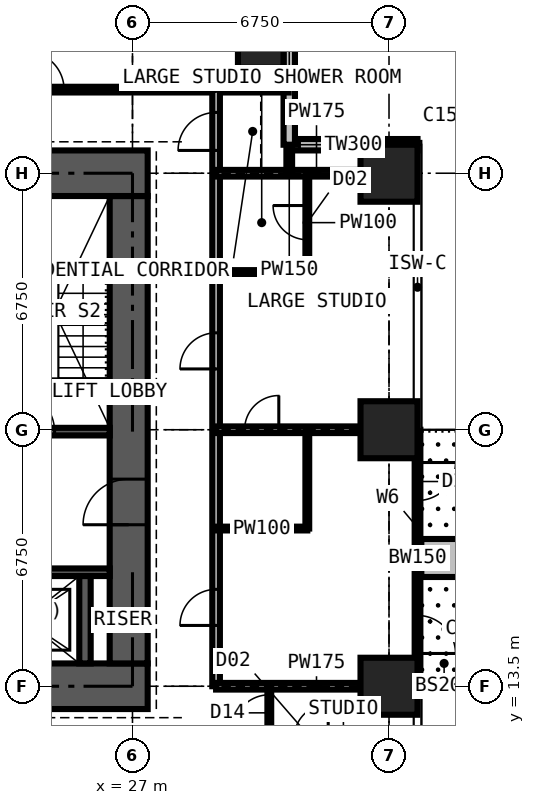
"""IFC4 building model, lengths in metres.
Left out: names, types, materials, properties, quantities, classifications, styles, units other than length and angle.
Written with IfcOpenShell. Run it as: python <this file> out.ifc"""

import sys

from ifc_helpers import new_model, si_unit, direction, frame, frame_2d, origin, origin_2d, place, context, subcontext, project, spatial, rectangle, extrude, element, fill, save


model = new_model("IFC4")
c1 = context("Model", 3, precision=1e-05, world=origin(), true_north=direction((0.0, 1.0)))
c2 = subcontext(c1, "Body", "Model", "MODEL_VIEW")
j1 = project(units=[si_unit("LENGTHUNIT", "METRE"), si_unit("PLANEANGLEUNIT", "RADIAN")], contexts=[c1])
p1 = place(None, origin())
s1 = spatial("IfcSite", under=j1, at=p1, CompositionType="ELEMENT")
p2 = place(p1, origin())
s2 = spatial("IfcBuilding", under=s1, at=p2, CompositionType="ELEMENT")
p3 = place(p2, frame((0.0, 0.0, 149.4)))
s3 = spatial("IfcBuildingStorey", under=s2, at=p3, CompositionType="ELEMENT", Elevation=149.4)
p4 = place(p3, frame((30.375, 30.375, 0.0), z_axis=(0.0, 0.0, 1.0), x_axis=(1.0, 0.0, 0.0)))
e1 = element("IfcColumn", 1, at=p4, inside=s3, PredefinedType="COLUMN", context=c2, shape_type="SweptSolid", body=[
    extrude(rectangle(XDim=1.2, YDim=1.2, at=origin_2d()), origin(), (0.0, 0.0, 1.0), 3.6),
])
for number, where, z_axis, x_axis in (
    (2, (33.75, 13.5, 0.0), (0.0, 0.0, 1.0), (1.0, 0.0, 0.0)),
    (3, (33.75, 20.25, 0.0), (0.0, 0.0, 1.0), (1.0, 0.0, 0.0)),
    (4, (33.75, 27.0, 0.0), (0.0, 0.0, 1.0), (1.0, 0.0, 0.0)),
):
    element("IfcColumn", number, at=place(p3, frame(where, z_axis=z_axis, x_axis=x_axis)), inside=s3, PredefinedType="COLUMN", context=c2, shape_type="SweptSolid", body=[
        extrude(rectangle(XDim=1.5, YDim=1.5, at=origin_2d()), origin(), (0.0, 0.0, 1.0), 3.6),
    ])
p5 = place(p3, frame((13.1, 13.5, 0.0), z_axis=(0.0, 0.0, 1.0), x_axis=(1.0, 0.0, 0.0)))
e5 = element("IfcWall", 5, at=p5, inside=s3, PredefinedType="SHEAR", context=c2, shape_type="SweptSolid", body=[
    extrude(rectangle(XDim=14.3, YDim=1.2, at=frame_2d((7.15, 0.0))), origin(), (0.0, 0.0, 1.0), 3.6),
])
p6 = place(p3, frame((26.9, 14.1, 0.0), z_axis=(0.0, 0.0, 1.0), x_axis=(0.0, 1.0, 0.0)))
e6 = element("IfcWall", 6, at=p6, inside=s3, PredefinedType="SHEAR", context=c2, shape_type="SweptSolid", body=[
    extrude(rectangle(XDim=12.3, YDim=1.0, at=frame_2d((6.15, 0.0))), origin(), (0.0, 0.0, 1.0), 3.6),
])
p7 = place(p6, frame((3.65, 0.0, 0.0)))
e7 = element("IfcOpeningElement", 7, at=p7, cuts=e6, PredefinedType="OPENING", context=c2, shape_type="SweptSolid", body=[
    extrude(rectangle(XDim=1.2, YDim=2.2, at=frame_2d((0.6, 1.1))), frame((0.0, 0.51, 0.0), z_axis=(0.0, -1.0, 0.0), x_axis=(1.0, 0.0, 0.0)), (0.0, 0.0, 1.0), 1.02),
])
p8 = place(p3, frame((27.4, 27.0, 0.0), z_axis=(0.0, 0.0, 1.0), x_axis=(-1.0, 0.0, 0.0)))
e8 = element("IfcWall", 8, at=p8, inside=s3, PredefinedType="SHEAR", context=c2, shape_type="SweptSolid", body=[
    extrude(rectangle(XDim=14.3, YDim=1.2, at=frame_2d((7.15, 0.0))), origin(), (0.0, 0.0, 1.0), 3.6),
])
p9 = place(p8, frame((5.225, 0.0, 0.0)))
e9 = element("IfcOpeningElement", 9, at=p9, cuts=e8, PredefinedType="OPENING", context=c2, shape_type="SweptSolid", body=[
    extrude(rectangle(XDim=0.9, YDim=2.2, at=frame_2d((0.45, 1.1))), frame((0.0, 0.61, 0.0), z_axis=(0.0, -1.0, 0.0), x_axis=(1.0, 0.0, 0.0)), (0.0, 0.0, 1.0), 1.22),
])
p10 = place(p8, frame((8.2, 0.0, 0.0)))
e10 = element("IfcOpeningElement", 10, at=p10, cuts=e8, PredefinedType="OPENING", context=c2, shape_type="SweptSolid", body=[
    extrude(rectangle(XDim=1.0, YDim=2.2, at=frame_2d((0.5, 1.1))), frame((0.0, 0.61, 0.0), z_axis=(0.0, -1.0, 0.0), x_axis=(1.0, 0.0, 0.0)), (0.0, 0.0, 1.0), 1.22),
])
p11 = place(p3, frame((34.5, 20.25, 0.0), z_axis=(0.0, 0.0, 1.0), x_axis=(0.0, -1.0, 0.0)))
e11 = element("IfcWall", 11, at=p11, inside=s3, PredefinedType="SOLIDWALL", context=c2, shape_type="SweptSolid", body=[
    extrude(rectangle(XDim=6.75, YDim=0.15, at=frame_2d((3.375, 0.0))), origin(), (0.0, 0.0, 1.0), 3.375),
])
p12 = place(p11, frame((0.863, 0.0, 0.0)))
e12 = element("IfcOpeningElement", 12, at=p12, cuts=e11, PredefinedType="OPENING", context=c2, shape_type="SweptSolid", body=[
    extrude(rectangle(XDim=1.0, YDim=2.2, at=frame_2d((0.5, 1.1))), frame((0.0, 0.085, 0.0), z_axis=(0.0, -1.0, 0.0), x_axis=(1.0, 0.0, 0.0)), (0.0, 0.0, 1.0), 0.17),
])
p13 = place(p11, frame((1.975, 0.0, 0.9)))
e13 = element("IfcOpeningElement", 13, at=p13, cuts=e11, PredefinedType="OPENING", context=c2, shape_type="SweptSolid", body=[
    extrude(rectangle(XDim=1.2, YDim=1.8, at=frame_2d((0.6, 0.9))), frame((0.0, 0.085, 0.0), z_axis=(0.0, -1.0, 0.0), x_axis=(1.0, 0.0, 0.0)), (0.0, 0.0, 1.0), 0.17),
])
p14 = place(p11, frame((4.887, 0.0, 0.0)))
e14 = element("IfcOpeningElement", 14, at=p14, cuts=e11, PredefinedType="OPENING", context=c2, shape_type="SweptSolid", body=[
    extrude(rectangle(XDim=1.0, YDim=2.2, at=frame_2d((0.5, 1.1))), frame((0.0, 0.085, 0.0), z_axis=(0.0, -1.0, 0.0), x_axis=(1.0, 0.0, 0.0)), (0.0, 0.0, 1.0), 0.17),
])
p15 = place(p11, frame((3.575, 0.0, 0.9)))
e15 = element("IfcOpeningElement", 15, at=p15, cuts=e11, PredefinedType="OPENING", context=c2, shape_type="SweptSolid", body=[
    extrude(rectangle(XDim=1.2, YDim=1.8, at=frame_2d((0.6, 0.9))), frame((0.0, 0.085, 0.0), z_axis=(0.0, -1.0, 0.0), x_axis=(1.0, 0.0, 0.0)), (0.0, 0.0, 1.0), 0.17),
])
p16 = place(p3, frame((34.5, 27.75, 0.0), z_axis=(0.0, 0.0, 1.0), x_axis=(-1.0, 0.0, 0.0)))
e16 = element("IfcWall", 16, at=p16, inside=s3, PredefinedType="SOLIDWALL", context=c2, shape_type="SweptSolid", body=[
    extrude(rectangle(XDim=3.375, YDim=0.3, at=frame_2d((1.688, 0.0))), origin(), (0.0, 0.0, 1.0), 3.375),
])
p17 = place(p16, frame((1.607, 0.0, 0.9)))
e17 = element("IfcOpeningElement", 17, at=p17, cuts=e16, PredefinedType="OPENING", context=c2, shape_type="SweptSolid", body=[
    extrude(rectangle(XDim=1.5, YDim=1.8, at=frame_2d((0.75, 0.9))), frame((0.0, 0.16, 0.0), z_axis=(0.0, -1.0, 0.0), x_axis=(1.0, 0.0, 0.0)), (0.0, 0.0, 1.0), 0.32),
])
p18 = place(p3, frame((31.125, 27.75, 0.0), z_axis=(0.0, 0.0, 1.0), x_axis=(0.0, 1.0, 0.0)))
e18 = element("IfcWall", 18, at=p18, inside=s3, PredefinedType="SOLIDWALL", context=c2, shape_type="SweptSolid", body=[
    extrude(rectangle(XDim=3.375, YDim=0.3, at=frame_2d((1.688, 0.0))), origin(), (0.0, 0.0, 1.0), 3.375),
])
p19 = place(p18, frame((1.663, 0.0, 0.9)))
e19 = element("IfcOpeningElement", 19, at=p19, cuts=e18, PredefinedType="OPENING", context=c2, shape_type="SweptSolid", body=[
    extrude(rectangle(XDim=1.5, YDim=1.8, at=frame_2d((0.75, 0.9))), frame((0.0, 0.16, 0.0), z_axis=(0.0, -1.0, 0.0), x_axis=(1.0, 0.0, 0.0)), (0.0, 0.0, 1.0), 0.32),
])
p20 = place(p3, frame((34.6, 16.875, 0.0), z_axis=(0.0, 0.0, 1.0), x_axis=(1.0, 0.0, 0.0)))
e20 = element("IfcWall", 20, at=p20, inside=s3, PredefinedType="USERDEFINED", context=c2, shape_type="SweptSolid", body=[
    extrude(rectangle(XDim=2.2, YDim=1.0, at=frame_2d((1.1, 0.0))), origin(), (0.0, 0.0, 1.0), 0.9),
])
p21 = place(p3, frame((14.1, 16.5, 0.0), z_axis=(0.0, 0.0, 1.0), x_axis=(1.0, 0.0, 0.0)))
e21 = element("IfcWall", 21, at=p21, inside=s3, PredefinedType="SHEAR", context=c2, shape_type="SweptSolid", body=[
    extrude(rectangle(XDim=12.3, YDim=0.2, at=frame_2d((6.15, 0.0))), origin(), (0.0, 0.0, 1.0), 3.6),
])
p22 = place(p21, frame((0.9, 0.0, 0.0)))
e22 = element("IfcOpeningElement", 22, at=p22, cuts=e21, PredefinedType="OPENING", context=c2, shape_type="SweptSolid", body=[
    extrude(rectangle(XDim=1.1, YDim=2.2, at=frame_2d((0.55, 1.1))), frame((0.0, 0.11, 0.0), z_axis=(0.0, -1.0, 0.0), x_axis=(1.0, 0.0, 0.0)), (0.0, 0.0, 1.0), 0.22),
])
p23 = place(p21, frame((4.31, 0.0, 0.0)))
e23 = element("IfcOpeningElement", 23, at=p23, cuts=e21, PredefinedType="OPENING", context=c2, shape_type="SweptSolid", body=[
    extrude(rectangle(XDim=1.1, YDim=2.2, at=frame_2d((0.55, 1.1))), frame((0.0, 0.11, 0.0), z_axis=(0.0, -1.0, 0.0), x_axis=(1.0, 0.0, 0.0)), (0.0, 0.0, 1.0), 0.22),
])
p24 = place(p21, frame((6.45, 0.0, 0.0)))
e24 = element("IfcOpeningElement", 24, at=p24, cuts=e21, PredefinedType="OPENING", context=c2, shape_type="SweptSolid", body=[
    extrude(rectangle(XDim=1.1, YDim=2.2, at=frame_2d((0.55, 1.1))), frame((0.0, 0.11, 0.0), z_axis=(0.0, -1.0, 0.0), x_axis=(1.0, 0.0, 0.0)), (0.0, 0.0, 1.0), 0.22),
])
p25 = place(p21, frame((9.5, 0.0, 0.0)))
e25 = element("IfcOpeningElement", 25, at=p25, cuts=e21, PredefinedType="OPENING", context=c2, shape_type="SweptSolid", body=[
    extrude(rectangle(XDim=1.1, YDim=2.2, at=frame_2d((0.55, 1.1))), frame((0.0, 0.11, 0.0), z_axis=(0.0, -1.0, 0.0), x_axis=(1.0, 0.0, 0.0)), (0.0, 0.0, 1.0), 0.22),
])
p26 = place(p3, frame((14.1, 20.2, 0.0), z_axis=(0.0, 0.0, 1.0), x_axis=(1.0, 0.0, 0.0)))
e26 = element("IfcWall", 26, at=p26, inside=s3, PredefinedType="SHEAR", context=c2, shape_type="SweptSolid", body=[
    extrude(rectangle(XDim=12.3, YDim=0.2, at=frame_2d((6.15, 0.0))), origin(), (0.0, 0.0, 1.0), 3.6),
])
p27 = place(p26, frame((4.56, 0.0, 0.0)))
e27 = element("IfcOpeningElement", 27, at=p27, cuts=e26, PredefinedType="OPENING", context=c2, shape_type="SweptSolid", body=[
    extrude(rectangle(XDim=1.1, YDim=2.2, at=frame_2d((0.55, 1.1))), frame((0.0, 0.11, 0.0), z_axis=(0.0, -1.0, 0.0), x_axis=(1.0, 0.0, 0.0)), (0.0, 0.0, 1.0), 0.22),
])
p28 = place(p26, frame((6.7, 0.0, 0.0)))
e28 = element("IfcOpeningElement", 28, at=p28, cuts=e26, PredefinedType="OPENING", context=c2, shape_type="SweptSolid", body=[
    extrude(rectangle(XDim=1.1, YDim=2.2, at=frame_2d((0.55, 1.1))), frame((0.0, 0.11, 0.0), z_axis=(0.0, -1.0, 0.0), x_axis=(1.0, 0.0, 0.0)), (0.0, 0.0, 1.0), 0.22),
])
p29 = place(p26, frame((0.35, 0.0, 0.0)))
e29 = element("IfcOpeningElement", 29, at=p29, cuts=e26, PredefinedType="OPENING", context=c2, shape_type="SweptSolid", body=[
    extrude(rectangle(XDim=1.1, YDim=2.2, at=frame_2d((0.55, 1.1))), frame((0.0, 0.11, 0.0), z_axis=(0.0, -1.0, 0.0), x_axis=(1.0, 0.0, 0.0)), (0.0, 0.0, 1.0), 0.22),
])
p30 = place(p26, frame((9.75, 0.0, 0.0)))
e30 = element("IfcOpeningElement", 30, at=p30, cuts=e26, PredefinedType="OPENING", context=c2, shape_type="SweptSolid", body=[
    extrude(rectangle(XDim=1.1, YDim=2.2, at=frame_2d((0.55, 1.1))), frame((0.0, 0.11, 0.0), z_axis=(0.0, -1.0, 0.0), x_axis=(1.0, 0.0, 0.0)), (0.0, 0.0, 1.0), 0.22),
])
p31 = place(p3, frame((25.75, 14.1, 0.0), z_axis=(0.0, 0.0, 1.0), x_axis=(0.0, 1.0, 0.0)))
e31 = element("IfcWall", 31, at=p31, inside=s3, PredefinedType="SHEAR", context=c2, shape_type="SweptSolid", body=[
    extrude(rectangle(XDim=2.3, YDim=0.3, at=frame_2d((1.15, 0.0))), origin(), (0.0, 0.0, 1.0), 3.6),
])
p32 = place(p3, frame((11.3, 29.2, 0.0), z_axis=(0.0, 0.0, 1.0), x_axis=(1.0, 0.0, 0.0)))
e32 = element("IfcWall", 32, at=p32, inside=s3, PredefinedType="PARTITIONING", context=c2, shape_type="SweptSolid", body=[
    extrude(rectangle(XDim=19.809, YDim=0.15, at=frame_2d((9.904, 0.0))), origin(), (0.0, 0.0, 1.0), 3.375),
])
p33 = place(p32, frame((12.9, 0.0, 0.0)))
e33 = element("IfcOpeningElement", 33, at=p33, cuts=e32, PredefinedType="OPENING", context=c2, shape_type="SweptSolid", body=[
    extrude(rectangle(XDim=1.0, YDim=2.2, at=frame_2d((0.5, 1.1))), frame((0.0, 0.085, 0.0), z_axis=(0.0, -1.0, 0.0), x_axis=(1.0, 0.0, 0.0)), (0.0, 0.0, 1.0), 0.17),
])
p34 = place(p32, frame((6.4, 0.0, 0.0)))
e34 = element("IfcOpeningElement", 34, at=p34, cuts=e32, PredefinedType="OPENING", context=c2, shape_type="SweptSolid", body=[
    extrude(rectangle(XDim=0.95, YDim=2.2, at=frame_2d((0.475, 1.1))), frame((0.0, 0.085, 0.0), z_axis=(0.0, -1.0, 0.0), x_axis=(1.0, 0.0, 0.0)), (0.0, 0.0, 1.0), 0.17),
])
p35 = place(p32, frame((0.6, 0.0, 0.0)))
e35 = element("IfcOpeningElement", 35, at=p35, cuts=e32, PredefinedType="OPENING", context=c2, shape_type="SweptSolid", body=[
    extrude(rectangle(XDim=1.0, YDim=2.2, at=frame_2d((0.5, 1.1))), frame((0.0, 0.085, 0.0), z_axis=(0.0, -1.0, 0.0), x_axis=(1.0, 0.0, 0.0)), (0.0, 0.0, 1.0), 0.17),
])
p36 = place(p3, frame((29.2, 13.5, 0.0), z_axis=(0.0, 0.0, 1.0), x_axis=(0.0, 1.0, 0.0)))
e36 = element("IfcWall", 36, at=p36, inside=s3, PredefinedType="PARTITIONING", context=c2, shape_type="SweptSolid", body=[
    extrude(rectangle(XDim=15.7, YDim=0.2, at=frame_2d((7.85, 0.0))), origin(), (0.0, 0.0, 1.0), 3.375),
])
p37 = place(p36, frame((8.35, 0.0, 0.0)))
e37 = element("IfcOpeningElement", 37, at=p37, cuts=e36, PredefinedType="OPENING", context=c2, shape_type="SweptSolid", body=[
    extrude(rectangle(XDim=0.95, YDim=2.2, at=frame_2d((0.475, 1.1))), frame((0.0, 0.11, 0.0), z_axis=(0.0, -1.0, 0.0), x_axis=(1.0, 0.0, 0.0)), (0.0, 0.0, 1.0), 0.22),
])
p38 = place(p36, frame((1.6, 0.0, 0.0)))
e38 = element("IfcOpeningElement", 38, at=p38, cuts=e36, PredefinedType="OPENING", context=c2, shape_type="SweptSolid", body=[
    extrude(rectangle(XDim=0.95, YDim=2.2, at=frame_2d((0.475, 1.1))), frame((0.0, 0.11, 0.0), z_axis=(0.0, -1.0, 0.0), x_axis=(1.0, 0.0, 0.0)), (0.0, 0.0, 1.0), 0.22),
])
p39 = place(p36, frame((14.1, 0.0, 0.0)))
e39 = element("IfcOpeningElement", 39, at=p39, cuts=e36, PredefinedType="OPENING", context=c2, shape_type="SweptSolid", body=[
    extrude(rectangle(XDim=1.0, YDim=2.2, at=frame_2d((0.5, 1.1))), frame((0.0, 0.11, 0.0), z_axis=(0.0, -1.0, 0.0), x_axis=(1.0, 0.0, 0.0)), (0.0, 0.0, 1.0), 0.22),
])
p40 = place(p3, frame((29.2, 13.5, 0.0), z_axis=(0.0, 0.0, 1.0), x_axis=(1.0, 0.0, 0.0)))
e40 = element("IfcWall", 40, at=p40, inside=s3, PredefinedType="PARTITIONING", context=c2, shape_type="SweptSolid", body=[
    extrude(rectangle(XDim=5.284, YDim=0.175, at=frame_2d((2.642, 0.0))), origin(), (0.0, 0.0, 1.0), 2.806),
])
p41 = place(p3, frame((29.2, 17.65, 0.0), z_axis=(0.0, 0.0, 1.0), x_axis=(1.0, 0.0, 0.0)))
e41 = element("IfcWall", 41, at=p41, inside=s3, PredefinedType="PARTITIONING", context=c2, shape_type="SweptSolid", body=[
    extrude(rectangle(XDim=2.4, YDim=0.1, at=frame_2d((1.2, 0.0))), origin(), (0.0, 0.0, 1.0), 3.375),
])
p42 = place(p3, frame((29.2, 20.25, 0.0), z_axis=(0.0, 0.0, 1.0), x_axis=(1.0, 0.0, 0.0)))
e42 = element("IfcWall", 42, at=p42, inside=s3, PredefinedType="PARTITIONING", context=c2, shape_type="SweptSolid", body=[
    extrude(rectangle(XDim=5.284, YDim=0.175, at=frame_2d((2.642, 0.0))), origin(), (0.0, 0.0, 1.0), 2.806),
])
p43 = place(p42, frame((0.75, 0.0, 0.0)))
e43 = element("IfcOpeningElement", 43, at=p43, cuts=e42, PredefinedType="OPENING", context=c2, shape_type="SweptSolid", body=[
    extrude(rectangle(XDim=0.9, YDim=2.2, at=frame_2d((0.45, 1.1))), frame((0.0, 0.097, 0.0), z_axis=(0.0, -1.0, 0.0), x_axis=(1.0, 0.0, 0.0)), (0.0, 0.0, 1.0), 0.195),
])
p44 = place(p3, frame((29.2, 24.4, 0.0), z_axis=(0.0, 0.0, 1.0), x_axis=(1.0, 0.0, 0.0)))
e44 = element("IfcWall", 44, at=p44, inside=s3, PredefinedType="PARTITIONING", context=c2, shape_type="SweptSolid", body=[
    extrude(rectangle(XDim=2.4, YDim=0.1, at=frame_2d((1.2, 0.0))), origin(), (0.0, 0.0, 1.0), 3.375),
])
p45 = place(p3, frame((29.2, 27.0, 0.0), z_axis=(0.0, 0.0, 1.0), x_axis=(1.0, 0.0, 0.0)))
e45 = element("IfcWall", 45, at=p45, inside=s3, PredefinedType="PARTITIONING", context=c2, shape_type="SweptSolid", body=[
    extrude(rectangle(XDim=5.284, YDim=0.175, at=frame_2d((2.642, 0.0))), origin(), (0.0, 0.0, 1.0), 2.806),
])
p46 = place(p3, frame((30.6, 10.125, 0.0), z_axis=(0.0, 0.0, 1.0), x_axis=(0.0, 1.0, 0.0)))
e46 = element("IfcWall", 46, at=p46, inside=s3, PredefinedType="PARTITIONING", context=c2, shape_type="SweptSolid", body=[
    extrude(rectangle(XDim=3.375, YDim=0.1, at=frame_2d((1.688, 0.0))), origin(), (0.0, 0.0, 1.0), 3.375),
])
p47 = place(p46, frame((2.2, 0.0, 0.0)))
e47 = element("IfcOpeningElement", 47, at=p47, cuts=e46, PredefinedType="OPENING", context=c2, shape_type="SweptSolid", body=[
    extrude(rectangle(XDim=0.95, YDim=2.2, at=frame_2d((0.475, 1.1))), frame((0.0, 0.06, 0.0), z_axis=(0.0, -1.0, 0.0), x_axis=(1.0, 0.0, 0.0)), (0.0, 0.0, 1.0), 0.12),
])
p48 = place(p3, frame((31.125, 27.0, 0.0), z_axis=(0.0, 0.0, 1.0), x_axis=(0.0, 1.0, 0.0)))
e48 = element("IfcWall", 48, at=p48, inside=s3, PredefinedType="PARTITIONING", context=c2, shape_type="SweptSolid", body=[
    extrude(rectangle(XDim=0.734, YDim=0.15, at=frame_2d((0.367, 0.0))), origin(), (0.0, 0.0, 1.0), 3.375),
])
p49 = place(p3, frame((31.6, 17.65, 0.0), z_axis=(0.0, 0.0, 1.0), x_axis=(0.0, 1.0, 0.0)))
e49 = element("IfcWall", 49, at=p49, inside=s3, PredefinedType="PARTITIONING", context=c2, shape_type="SweptSolid", body=[
    extrude(rectangle(XDim=2.6, YDim=0.1, at=frame_2d((1.3, 0.0))), origin(), (0.0, 0.0, 1.0), 3.375),
])
p50 = place(p3, frame((31.6, 24.4, 0.0), z_axis=(0.0, 0.0, 1.0), x_axis=(0.0, 1.0, 0.0)))
e50 = element("IfcWall", 50, at=p50, inside=s3, PredefinedType="PARTITIONING", context=c2, shape_type="SweptSolid", body=[
    extrude(rectangle(XDim=2.6, YDim=0.1, at=frame_2d((1.3, 0.0))), origin(), (0.0, 0.0, 1.0), 3.375),
])
p51 = place(p50, frame((0.85, 0.0, 0.0)))
e51 = element("IfcOpeningElement", 51, at=p51, cuts=e50, PredefinedType="OPENING", context=c2, shape_type="SweptSolid", body=[
    extrude(rectangle(XDim=0.9, YDim=2.2, at=frame_2d((0.45, 1.1))), frame((0.0, 0.06, 0.0), z_axis=(0.0, -1.0, 0.0), x_axis=(1.0, 0.0, 0.0)), (0.0, 0.0, 1.0), 0.12),
])
p52 = place(p12, origin())
e52 = element("IfcDoor", 52, at=p52, inside=s3, OperationType="SINGLE_SWING_LEFT", PredefinedType="DOOR", context=c2, shape_type="SweptSolid", body=[
    extrude(rectangle(XDim=1.0, YDim=2.2, at=frame_2d((0.5, 1.1))), frame((0.0, 0.025, 0.0), z_axis=(0.0, -1.0, 0.0), x_axis=(1.0, 0.0, 0.0)), (0.0, 0.0, 1.0), 0.05),
])
fill(e12, e52)
p53 = place(p13, origin())
e53 = element("IfcWindow", 53, at=p53, inside=s3, PartitioningType="SINGLE_PANEL", PredefinedType="WINDOW", context=c2, shape_type="SweptSolid", body=[
    extrude(rectangle(XDim=1.2, YDim=1.8, at=frame_2d((0.6, 0.9))), frame((0.0, 0.03, 0.0), z_axis=(0.0, -1.0, 0.0), x_axis=(1.0, 0.0, 0.0)), (0.0, 0.0, 1.0), 0.06),
])
fill(e13, e53)
p54 = place(p14, origin())
e54 = element("IfcDoor", 54, at=p54, inside=s3, OperationType="SINGLE_SWING_RIGHT", PredefinedType="DOOR", context=c2, shape_type="SweptSolid", body=[
    extrude(rectangle(XDim=1.0, YDim=2.2, at=frame_2d((0.5, 1.1))), frame((0.0, 0.025, 0.0), z_axis=(0.0, -1.0, 0.0), x_axis=(1.0, 0.0, 0.0)), (0.0, 0.0, 1.0), 0.05),
])
fill(e14, e54)
p55 = place(p15, origin())
e55 = element("IfcWindow", 55, at=p55, inside=s3, PartitioningType="SINGLE_PANEL", PredefinedType="WINDOW", context=c2, shape_type="SweptSolid", body=[
    extrude(rectangle(XDim=1.2, YDim=1.8, at=frame_2d((0.6, 0.9))), frame((0.0, 0.03, 0.0), z_axis=(0.0, -1.0, 0.0), x_axis=(1.0, 0.0, 0.0)), (0.0, 0.0, 1.0), 0.06),
])
fill(e15, e55)
p56 = place(p17, origin())
e56 = element("IfcWindow", 56, at=p56, inside=s3, PartitioningType="SINGLE_PANEL", PredefinedType="WINDOW", context=c2, shape_type="SweptSolid", body=[
    extrude(rectangle(XDim=1.5, YDim=1.8, at=frame_2d((0.75, 0.9))), frame((0.0, 0.03, 0.0), z_axis=(0.0, -1.0, 0.0), x_axis=(1.0, 0.0, 0.0)), (0.0, 0.0, 1.0), 0.06),
])
fill(e17, e56)
p57 = place(p19, origin())
e57 = element("IfcWindow", 57, at=p57, inside=s3, PartitioningType="SINGLE_PANEL", PredefinedType="WINDOW", context=c2, shape_type="SweptSolid", body=[
    extrude(rectangle(XDim=1.5, YDim=1.8, at=frame_2d((0.75, 0.9))), frame((0.0, 0.03, 0.0), z_axis=(0.0, -1.0, 0.0), x_axis=(1.0, 0.0, 0.0)), (0.0, 0.0, 1.0), 0.06),
])
fill(e19, e57)
p58 = place(p7, origin())
e58 = element("IfcDoor", 58, at=p58, inside=s3, OperationType="DOUBLE_DOOR_SINGLE_SWING", PredefinedType="DOOR", context=c2, shape_type="SweptSolid", body=[
    extrude(rectangle(XDim=1.2, YDim=2.2, at=frame_2d((0.6, 1.1))), frame((0.0, 0.025, 0.0), z_axis=(0.0, -1.0, 0.0), x_axis=(1.0, 0.0, 0.0)), (0.0, 0.0, 1.0), 0.05),
])
fill(e7, e58)
p59 = place(p30, origin())
e59 = element("IfcDoor", 59, at=p59, inside=s3, OperationType="SINGLE_SWING_LEFT", PredefinedType="DOOR", context=c2, shape_type="SweptSolid", body=[
    extrude(rectangle(XDim=1.1, YDim=2.2, at=frame_2d((0.55, 1.1))), frame((0.0, 0.025, 0.0), z_axis=(0.0, -1.0, 0.0), x_axis=(1.0, 0.0, 0.0)), (0.0, 0.0, 1.0), 0.05),
])
fill(e30, e59)
p60 = place(p37, origin())
e60 = element("IfcDoor", 60, at=p60, inside=s3, OperationType="SINGLE_SWING_LEFT", PredefinedType="DOOR", context=c2, shape_type="SweptSolid", body=[
    extrude(rectangle(XDim=0.95, YDim=2.2, at=frame_2d((0.475, 1.1))), frame((0.0, 0.025, 0.0), z_axis=(0.0, -1.0, 0.0), x_axis=(1.0, 0.0, 0.0)), (0.0, 0.0, 1.0), 0.05),
])
fill(e37, e60)
p61 = place(p51, origin())
e61 = element("IfcDoor", 61, at=p61, inside=s3, OperationType="SINGLE_SWING_RIGHT", PredefinedType="DOOR", context=c2, shape_type="SweptSolid", body=[
    extrude(rectangle(XDim=0.9, YDim=2.2, at=frame_2d((0.45, 1.1))), frame((0.0, 0.025, 0.0), z_axis=(0.0, -1.0, 0.0), x_axis=(1.0, 0.0, 0.0)), (0.0, 0.0, 1.0), 0.05),
])
fill(e51, e61)
p62 = place(p38, origin())
e62 = element("IfcDoor", 62, at=p62, inside=s3, OperationType="SINGLE_SWING_LEFT", PredefinedType="DOOR", context=c2, shape_type="SweptSolid", body=[
    extrude(rectangle(XDim=0.95, YDim=2.2, at=frame_2d((0.475, 1.1))), frame((0.0, 0.025, 0.0), z_axis=(0.0, -1.0, 0.0), x_axis=(1.0, 0.0, 0.0)), (0.0, 0.0, 1.0), 0.05),
])
fill(e38, e62)
p63 = place(p43, origin())
e63 = element("IfcDoor", 63, at=p63, inside=s3, OperationType="SINGLE_SWING_RIGHT", PredefinedType="DOOR", context=c2, shape_type="SweptSolid", body=[
    extrude(rectangle(XDim=0.9, YDim=2.2, at=frame_2d((0.45, 1.1))), frame((0.0, 0.025, 0.0), z_axis=(0.0, -1.0, 0.0), x_axis=(1.0, 0.0, 0.0)), (0.0, 0.0, 1.0), 0.05),
])
fill(e43, e63)
p64 = place(p47, origin())
e64 = element("IfcDoor", 64, at=p64, inside=s3, OperationType="SINGLE_SWING_LEFT", PredefinedType="DOOR", context=c2, shape_type="SweptSolid", body=[
    extrude(rectangle(XDim=0.95, YDim=2.2, at=frame_2d((0.475, 1.1))), frame((0.0, 0.025, 0.0), z_axis=(0.0, -1.0, 0.0), x_axis=(1.0, 0.0, 0.0)), (0.0, 0.0, 1.0), 0.05),
])
fill(e47, e64)
p65 = place(p39, origin())
e65 = element("IfcDoor", 65, at=p65, inside=s3, OperationType="SINGLE_SWING_LEFT", PredefinedType="DOOR", context=c2, shape_type="SweptSolid", body=[
    extrude(rectangle(XDim=1.0, YDim=2.2, at=frame_2d((0.5, 1.1))), frame((0.0, 0.025, 0.0), z_axis=(0.0, -1.0, 0.0), x_axis=(1.0, 0.0, 0.0)), (0.0, 0.0, 1.0), 0.05),
])
fill(e39, e65)
p66 = place(p33, origin())
e66 = element("IfcDoor", 66, at=p66, inside=s3, OperationType="SINGLE_SWING_LEFT", PredefinedType="DOOR", context=c2, shape_type="SweptSolid", body=[
    extrude(rectangle(XDim=1.0, YDim=2.2, at=frame_2d((0.5, 1.1))), frame((0.0, 0.025, 0.0), z_axis=(0.0, -1.0, 0.0), x_axis=(1.0, 0.0, 0.0)), (0.0, 0.0, 1.0), 0.05),
])
fill(e33, e66)
save(model, sys.argv[1])
